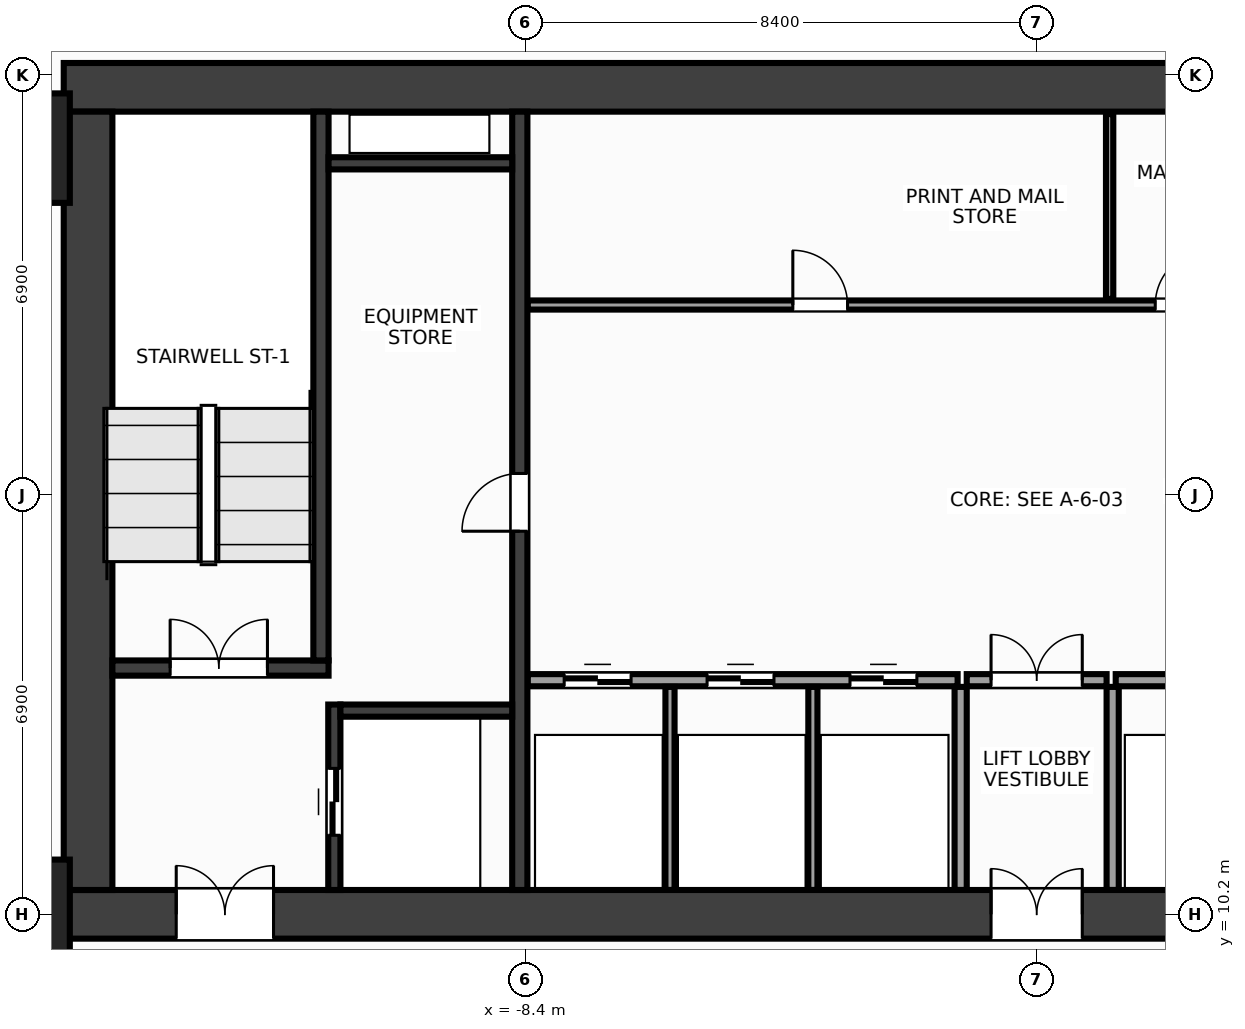
"""IFC4 building model, lengths in metres.
Left out: names, types, materials, properties, quantities, classifications, styles, units other than length and angle.
Written with IfcOpenShell. Run it as: python <this file> out.ifc"""

import sys

from ifc_helpers import new_model, si_unit, direction, frame, frame_2d, origin, origin_2d, place, context, subcontext, project, spatial, rectangle, extrude, source, transform, mapped, element, fill, save


model = new_model("IFC4")
c1 = context("Model", 3, precision=1e-05, world=origin(), true_north=direction((0.0, 1.0)))
c2 = subcontext(c1, "Body", "Model", "MODEL_VIEW")
j1 = project(units=[si_unit("LENGTHUNIT", "METRE"), si_unit("PLANEANGLEUNIT", "RADIAN")], contexts=[c1])
p1 = place(None, origin())
s1 = spatial("IfcSite", under=j1, at=p1, CompositionType="ELEMENT")
p2 = place(p1, origin())
s2 = spatial("IfcBuilding", under=s1, at=p2, CompositionType="ELEMENT")
p3 = place(p2, frame((0.0, 0.0, 45.2)))
s3 = spatial("IfcBuildingStorey", under=s2, at=p3, CompositionType="ELEMENT", Elevation=45.2)
m1 = source(origin(), c2, "Body", "SweptSolid", [
    extrude(rectangle(XDim=32.0, YDim=0.8, at=frame_2d((16.0, 0.0))), origin(), (0.0, 0.0, 1.0), 3.6),
])
p4 = place(p3, frame((-16.0, 23.8, 0.0), z_axis=(0.0, 0.0, 1.0), x_axis=(1.0, 0.0, 0.0)))
e1 = element("IfcWall", 1, at=p4, inside=s3, PredefinedType="SHEAR", context=c2, shape_type="MappedRepresentation", body=[
    mapped(m1, transform((0.0, 0.0, 0.0), x_axis=(1.0, 0.0, 0.0), y_axis=(0.0, 1.0, 0.0), z_axis=(0.0, 0.0, 1.0), scale=1.0)),
])
p5 = place(p3, frame((-16.0, 10.2, 0.0), z_axis=(0.0, 0.0, 1.0), x_axis=(1.0, 0.0, 0.0)))
e2 = element("IfcWall", 2, at=p5, inside=s3, PredefinedType="SHEAR", context=c2, shape_type="MappedRepresentation", body=[
    mapped(m1, transform((0.0, 0.0, 0.0), x_axis=(1.0, 0.0, 0.0), y_axis=(0.0, 1.0, 0.0), z_axis=(0.0, 0.0, 1.0), scale=1.0)),
])
p6 = place(p5, frame((1.85, 0.0, 0.0)))
e3 = element("IfcOpeningElement", 3, at=p6, cuts=e2, PredefinedType="OPENING", context=c2, shape_type="SweptSolid", body=[
    extrude(rectangle(XDim=1.6, YDim=2.15, at=frame_2d((0.8, 1.075))), frame((0.0, 0.412, 0.0), z_axis=(0.0, -1.0, 0.0), x_axis=(1.0, 0.0, 0.0)), (0.0, 0.0, 1.0), 0.824),
])
p7 = place(p5, frame((28.55, 0.0, 0.0)))
e4 = element("IfcOpeningElement", 4, at=p7, cuts=e2, PredefinedType="OPENING", context=c2, shape_type="SweptSolid", body=[
    extrude(rectangle(XDim=1.6, YDim=2.15, at=frame_2d((0.8, 1.075))), frame((0.0, 0.412, 0.0), z_axis=(0.0, -1.0, 0.0), x_axis=(1.0, 0.0, 0.0)), (0.0, 0.0, 1.0), 0.824),
])
p8 = place(p5, frame((15.25, 0.0, 0.0)))
e5 = element("IfcOpeningElement", 5, at=p8, cuts=e2, PredefinedType="OPENING", context=c2, shape_type="SweptSolid", body=[
    extrude(rectangle(XDim=1.5, YDim=2.2, at=frame_2d((0.75, 1.1))), frame((0.0, 0.412, 0.0), z_axis=(0.0, -1.0, 0.0), x_axis=(1.0, 0.0, 0.0)), (0.0, 0.0, 1.0), 0.824),
])
m2 = source(origin(), c2, "Body", "SweptSolid", [
    extrude(rectangle(XDim=12.8, YDim=0.8, at=frame_2d((6.4, 0.0))), origin(), (0.0, 0.0, 1.0), 3.6),
])
p9 = place(p3, frame((-15.6, 10.6, 0.0), z_axis=(0.0, 0.0, 1.0), x_axis=(0.0, 1.0, 0.0)))
e6 = element("IfcWall", 6, at=p9, inside=s3, PredefinedType="SHEAR", context=c2, shape_type="MappedRepresentation", body=[
    mapped(m2, transform((0.0, 0.0, 0.0), x_axis=(1.0, 0.0, 0.0), y_axis=(0.0, 1.0, 0.0), z_axis=(0.0, 0.0, 1.0), scale=1.0)),
])
m3 = source(origin(), c2, "Body", "SweptSolid", [
    extrude(rectangle(XDim=12.8, YDim=0.25, at=frame_2d((6.4, 0.0))), origin(), (0.0, 0.0, 1.0), 3.6),
])
p10 = place(p3, frame((-8.5, 10.6, 0.0), z_axis=(0.0, 0.0, 1.0), x_axis=(0.0, 1.0, 0.0)))
e7 = element("IfcWall", 7, at=p10, inside=s3, PredefinedType="SHEAR", context=c2, shape_type="MappedRepresentation", body=[
    mapped(m3, transform((0.0, 0.0, 0.0), x_axis=(1.0, 0.0, 0.0), y_axis=(0.0, 1.0, 0.0), z_axis=(0.0, 0.0, 1.0), scale=1.0)),
])
p11 = place(p10, frame((5.9, 0.0, 0.0)))
e8 = element("IfcOpeningElement", 8, at=p11, cuts=e7, PredefinedType="OPENING", context=c2, shape_type="SweptSolid", body=[
    extrude(rectangle(XDim=0.95, YDim=2.15, at=frame_2d((0.475, 1.075))), frame((0.0, 0.137, 0.0), z_axis=(0.0, -1.0, 0.0), x_axis=(1.0, 0.0, 0.0)), (0.0, 0.0, 1.0), 0.274),
])
m4 = source(origin(), c2, "Body", "SweptSolid", [
    extrude(rectangle(XDim=3.555, YDim=0.25, at=frame_2d((1.777, 0.0))), origin(), (0.0, 0.0, 1.0), 3.6),
])
p12 = place(p3, frame((-15.2, 14.25, 0.0), z_axis=(0.0, 0.0, 1.0), x_axis=(1.0, 0.0, 0.0)))
e9 = element("IfcWall", 9, at=p12, inside=s3, PredefinedType="SHEAR", context=c2, shape_type="MappedRepresentation", body=[
    mapped(m4, transform((0.0, 0.0, 0.0), x_axis=(1.0, 0.0, 0.0), y_axis=(0.0, 1.0, 0.0), z_axis=(0.0, 0.0, 1.0), scale=1.0)),
])
p13 = place(p12, frame((0.95, 0.0, 0.0)))
e10 = element("IfcOpeningElement", 10, at=p13, cuts=e9, PredefinedType="OPENING", context=c2, shape_type="SweptSolid", body=[
    extrude(rectangle(XDim=1.6, YDim=2.15, at=frame_2d((0.8, 1.075))), frame((0.0, 0.137, 0.0), z_axis=(0.0, -1.0, 0.0), x_axis=(1.0, 0.0, 0.0)), (0.0, 0.0, 1.0), 0.274),
])
m5 = source(origin(), c2, "Body", "SweptSolid", [
    extrude(rectangle(XDim=9.025, YDim=0.25, at=frame_2d((4.512, 0.0))), origin(), (0.0, 0.0, 1.0), 3.6),
])
p14 = place(p3, frame((-11.77, 14.375, 0.0), z_axis=(0.0, 0.0, 1.0), x_axis=(0.0, 1.0, 0.0)))
e11 = element("IfcWall", 11, at=p14, inside=s3, PredefinedType="SHEAR", context=c2, shape_type="MappedRepresentation", body=[
    mapped(m5, transform((0.0, 0.0, 0.0), x_axis=(1.0, 0.0, 0.0), y_axis=(0.0, 1.0, 0.0), z_axis=(0.0, 0.0, 1.0), scale=1.0)),
])
m6 = source(origin(), c2, "Body", "SweptSolid", [
    extrude(rectangle(XDim=3.05, YDim=0.2, at=frame_2d((1.525, 0.0))), origin(), (0.0, 0.0, 1.0), 3.6),
])
p15 = place(p3, frame((-11.55, 10.6, 0.0), z_axis=(0.0, 0.0, 1.0), x_axis=(0.0, 1.0, 0.0)))
e12 = element("IfcWall", 12, at=p15, inside=s3, PredefinedType="SHEAR", context=c2, shape_type="MappedRepresentation", body=[
    mapped(m6, transform((0.0, 0.0, 0.0), x_axis=(1.0, 0.0, 0.0), y_axis=(0.0, 1.0, 0.0), z_axis=(0.0, 0.0, 1.0), scale=1.0)),
])
p16 = place(p15, frame((0.9, 0.0, 0.0)))
e13 = element("IfcOpeningElement", 13, at=p16, cuts=e12, PredefinedType="OPENING", context=c2, shape_type="SweptSolid", body=[
    extrude(rectangle(XDim=1.1, YDim=2.15, at=frame_2d((0.55, 1.075))), frame((0.0, 0.112, 0.0), z_axis=(0.0, -1.0, 0.0), x_axis=(1.0, 0.0, 0.0)), (0.0, 0.0, 1.0), 0.224),
])
m7 = source(origin(), c2, "Body", "SweptSolid", [
    extrude(rectangle(XDim=2.825, YDim=0.2, at=frame_2d((1.413, 0.0))), origin(), (0.0, 0.0, 1.0), 3.6),
])
p17 = place(p3, frame((-11.45, 13.55, 0.0), z_axis=(0.0, 0.0, 1.0), x_axis=(1.0, 0.0, 0.0)))
e14 = element("IfcWall", 14, at=p17, inside=s3, PredefinedType="SHEAR", context=c2, shape_type="MappedRepresentation", body=[
    mapped(m7, transform((0.0, 0.0, 0.0), x_axis=(1.0, 0.0, 0.0), y_axis=(0.0, 1.0, 0.0), z_axis=(0.0, 0.0, 1.0), scale=1.0)),
])
m8 = source(origin(), c2, "Body", "SweptSolid", [
    extrude(rectangle(XDim=3.02, YDim=0.2, at=frame_2d((1.51, 0.0))), origin(), (0.0, 0.0, 1.0), 3.6),
])
p18 = place(p3, frame((-11.645, 22.55, 0.0), z_axis=(0.0, 0.0, 1.0), x_axis=(1.0, 0.0, 0.0)))
e15 = element("IfcWall", 15, at=p18, inside=s3, PredefinedType="SHEAR", context=c2, shape_type="MappedRepresentation", body=[
    mapped(m8, transform((0.0, 0.0, 0.0), x_axis=(1.0, 0.0, 0.0), y_axis=(0.0, 1.0, 0.0), z_axis=(0.0, 0.0, 1.0), scale=1.0)),
])
m9 = source(origin(), c2, "Body", "SweptSolid", [
    extrude(rectangle(XDim=1.8, YDim=1.8, at=origin_2d()), origin(), (0.0, 0.0, 1.0), 3.6),
])
for number, where, z_axis, x_axis in (
    (16, (-16.8, 10.2, 0.0), (0.0, 0.0, 1.0), (1.0, 0.0, 0.0)),
    (17, (-16.8, 22.8, 0.0), (0.0, 0.0, 1.0), (1.0, 0.0, 0.0)),
):
    element("IfcColumn", number, at=place(p3, frame(where, z_axis=z_axis, x_axis=x_axis)), inside=s3, PredefinedType="COLUMN", context=c2, shape_type="MappedRepresentation", body=[
        mapped(m9, transform((0.0, 0.0, 0.0), x_axis=(1.0, 0.0, 0.0), y_axis=(0.0, 1.0, 0.0), z_axis=(0.0, 0.0, 1.0), scale=1.0)),
    ])
m10 = source(origin(), c2, "Body", "SweptSolid", [
    extrude(rectangle(XDim=7.07, YDim=0.2, at=frame_2d((3.535, 0.0))), origin(), (0.0, 0.0, 1.0), 3.36),
])
p19 = place(p3, frame((-8.37, 14.05, 0.0), z_axis=(0.0, 0.0, 1.0), x_axis=(1.0, 0.0, 0.0)))
e18 = element("IfcWall", 18, at=p19, inside=s3, PredefinedType="PARTITIONING", context=c2, shape_type="MappedRepresentation", body=[
    mapped(m10, transform((0.0, 0.0, 0.0), x_axis=(1.0, 0.0, 0.0), y_axis=(0.0, 1.0, 0.0), z_axis=(0.0, 0.0, 1.0), scale=1.0)),
])
p20 = place(p19, frame((0.6, 0.0, 0.0)))
e19 = element("IfcOpeningElement", 19, at=p20, cuts=e18, PredefinedType="OPENING", context=c2, shape_type="SweptSolid", body=[
    extrude(rectangle(XDim=1.1, YDim=2.15, at=frame_2d((0.55, 1.075))), frame((0.0, 0.112, 0.0), z_axis=(0.0, -1.0, 0.0), x_axis=(1.0, 0.0, 0.0)), (0.0, 0.0, 1.0), 0.224),
])
p21 = place(p19, frame((2.95, 0.0, 0.0)))
e20 = element("IfcOpeningElement", 20, at=p21, cuts=e18, PredefinedType="OPENING", context=c2, shape_type="SweptSolid", body=[
    extrude(rectangle(XDim=1.1, YDim=2.15, at=frame_2d((0.55, 1.075))), frame((0.0, 0.112, 0.0), z_axis=(0.0, -1.0, 0.0), x_axis=(1.0, 0.0, 0.0)), (0.0, 0.0, 1.0), 0.224),
])
p22 = place(p19, frame((5.3, 0.0, 0.0)))
e21 = element("IfcOpeningElement", 21, at=p22, cuts=e18, PredefinedType="OPENING", context=c2, shape_type="SweptSolid", body=[
    extrude(rectangle(XDim=1.1, YDim=2.15, at=frame_2d((0.55, 1.075))), frame((0.0, 0.112, 0.0), z_axis=(0.0, -1.0, 0.0), x_axis=(1.0, 0.0, 0.0)), (0.0, 0.0, 1.0), 0.224),
])
p23 = place(p3, frame((1.3, 14.05, 0.0), z_axis=(0.0, 0.0, 1.0), x_axis=(1.0, 0.0, 0.0)))
e22 = element("IfcWall", 22, at=p23, inside=s3, PredefinedType="PARTITIONING", context=c2, shape_type="MappedRepresentation", body=[
    mapped(m10, transform((0.0, 0.0, 0.0), x_axis=(1.0, 0.0, 0.0), y_axis=(0.0, 1.0, 0.0), z_axis=(0.0, 0.0, 1.0), scale=1.0)),
])
m11 = source(origin(), c2, "Body", "SweptSolid", [
    extrude(rectangle(XDim=3.34, YDim=0.2, at=frame_2d((1.67, 0.0))), origin(), (0.0, 0.0, 1.0), 3.36),
])
for number, where, z_axis, x_axis in (
    (23, (-1.25, 10.6, 0.0), (0.0, 0.0, 1.0), (0.0, 1.0, 0.0)),
    (24, (1.25, 10.6, 0.0), (0.0, 0.0, 1.0), (0.0, 1.0, 0.0)),
):
    element("IfcWall", number, at=place(p3, frame(where, z_axis=z_axis, x_axis=x_axis)), inside=s3, PredefinedType="PARTITIONING", context=c2, shape_type="MappedRepresentation", body=[
        mapped(m11, transform((0.0, 0.0, 0.0), x_axis=(1.0, 0.0, 0.0), y_axis=(0.0, 1.0, 0.0), z_axis=(0.0, 0.0, 1.0), scale=1.0)),
    ])
m12 = source(origin(), c2, "Body", "SweptSolid", [
    extrude(rectangle(XDim=2.3, YDim=0.2, at=frame_2d((1.15, 0.0))), origin(), (0.0, 0.0, 1.0), 3.36),
])
p24 = place(p3, frame((-1.15, 14.05, 0.0), z_axis=(0.0, 0.0, 1.0), x_axis=(1.0, 0.0, 0.0)))
e25 = element("IfcWall", 25, at=p24, inside=s3, PredefinedType="PARTITIONING", context=c2, shape_type="MappedRepresentation", body=[
    mapped(m12, transform((0.0, 0.0, 0.0), x_axis=(1.0, 0.0, 0.0), y_axis=(0.0, 1.0, 0.0), z_axis=(0.0, 0.0, 1.0), scale=1.0)),
])
p25 = place(p24, frame((0.4, 0.0, 0.0)))
e26 = element("IfcOpeningElement", 26, at=p25, cuts=e25, PredefinedType="OPENING", context=c2, shape_type="SweptSolid", body=[
    extrude(rectangle(XDim=1.5, YDim=2.2, at=frame_2d((0.75, 1.1))), frame((0.0, 0.112, 0.0), z_axis=(0.0, -1.0, 0.0), x_axis=(1.0, 0.0, 0.0)), (0.0, 0.0, 1.0), 0.224),
])
m13 = source(origin(), c2, "Body", "SweptSolid", [
    extrude(rectangle(XDim=14.59, YDim=0.15, at=frame_2d((7.295, 0.0))), origin(), (0.0, 0.0, 1.0), 3.36),
])
p26 = place(p3, frame((-8.37, 20.22, 0.0), z_axis=(0.0, 0.0, 1.0), x_axis=(1.0, 0.0, 0.0)))
e27 = element("IfcWall", 27, at=p26, inside=s3, PredefinedType="PARTITIONING", context=c2, shape_type="MappedRepresentation", body=[
    mapped(m13, transform((0.0, 0.0, 0.0), x_axis=(1.0, 0.0, 0.0), y_axis=(0.0, 1.0, 0.0), z_axis=(0.0, 0.0, 1.0), scale=1.0)),
])
p27 = place(p26, frame((4.36, 0.0, 0.0)))
e28 = element("IfcOpeningElement", 28, at=p27, cuts=e27, PredefinedType="OPENING", context=c2, shape_type="SweptSolid", body=[
    extrude(rectangle(XDim=0.9, YDim=2.15, at=frame_2d((0.45, 1.075))), frame((0.0, 0.087, 0.0), z_axis=(0.0, -1.0, 0.0), x_axis=(1.0, 0.0, 0.0)), (0.0, 0.0, 1.0), 0.174),
])
p28 = place(p26, frame((10.32, 0.0, 0.0)))
e29 = element("IfcOpeningElement", 29, at=p28, cuts=e27, PredefinedType="OPENING", context=c2, shape_type="SweptSolid", body=[
    extrude(rectangle(XDim=0.9, YDim=2.15, at=frame_2d((0.45, 1.075))), frame((0.0, 0.087, 0.0), z_axis=(0.0, -1.0, 0.0), x_axis=(1.0, 0.0, 0.0)), (0.0, 0.0, 1.0), 0.174),
])
p29 = place(p26, frame((12.77, 0.0, 0.0)))
e30 = element("IfcOpeningElement", 30, at=p29, cuts=e27, PredefinedType="OPENING", context=c2, shape_type="SweptSolid", body=[
    extrude(rectangle(XDim=0.9, YDim=2.15, at=frame_2d((0.45, 1.075))), frame((0.0, 0.087, 0.0), z_axis=(0.0, -1.0, 0.0), x_axis=(1.0, 0.0, 0.0)), (0.0, 0.0, 1.0), 0.174),
])
m14 = source(origin(), c2, "Body", "SweptSolid", [
    extrude(rectangle(XDim=3.34, YDim=0.15, at=frame_2d((1.67, 0.0))), origin(), (0.0, 0.0, 1.0), 3.36),
])
for number, where, z_axis, x_axis in (
    (31, (-6.03, 10.6, 0.0), (0.0, 0.0, 1.0), (0.0, 1.0, 0.0)),
    (32, (-3.68, 10.6, 0.0), (0.0, 0.0, 1.0), (0.0, 1.0, 0.0)),
):
    element("IfcWall", number, at=place(p3, frame(where, z_axis=z_axis, x_axis=x_axis)), inside=s3, PredefinedType="PARTITIONING", context=c2, shape_type="MappedRepresentation", body=[
        mapped(m14, transform((0.0, 0.0, 0.0), x_axis=(1.0, 0.0, 0.0), y_axis=(0.0, 1.0, 0.0), z_axis=(0.0, 0.0, 1.0), scale=1.0)),
    ])
m15 = source(origin(), c2, "Body", "SweptSolid", [
    extrude(rectangle(XDim=3.04, YDim=0.12, at=frame_2d((1.52, 0.0))), origin(), (0.0, 0.0, 1.0), 3.36),
])
p30 = place(p3, frame((1.2, 20.32, 0.0), z_axis=(0.0, 0.0, 1.0), x_axis=(0.0, 1.0, 0.0)))
e33 = element("IfcWall", 33, at=p30, inside=s3, PredefinedType="PARTITIONING", context=c2, shape_type="MappedRepresentation", body=[
    mapped(m15, transform((0.0, 0.0, 0.0), x_axis=(1.0, 0.0, 0.0), y_axis=(0.0, 1.0, 0.0), z_axis=(0.0, 0.0, 1.0), scale=1.0)),
])
m16 = source(origin(), c2, "Body", "SweptSolid", [
    extrude(rectangle(XDim=1.6, YDim=2.15, at=frame_2d((0.8, 1.075))), frame((0.0, 0.025, 0.0), z_axis=(0.0, -1.0, 0.0), x_axis=(1.0, 0.0, 0.0)), (0.0, 0.0, 1.0), 0.05),
])
p31 = place(p13, origin())
e34 = element("IfcDoor", 34, at=p31, inside=s3, OperationType="DOUBLE_DOOR_SINGLE_SWING", PredefinedType="DOOR", context=c2, shape_type="MappedRepresentation", body=[
    mapped(m16, transform((0.0, 0.0, 0.0), x_axis=(1.0, 0.0, 0.0), y_axis=(0.0, 1.0, 0.0), z_axis=(0.0, 0.0, 1.0), scale=1.0)),
])
fill(e10, e34)
p32 = place(p6, origin())
e35 = element("IfcDoor", 35, at=p32, inside=s3, OperationType="DOUBLE_DOOR_SINGLE_SWING", PredefinedType="DOOR", context=c2, shape_type="MappedRepresentation", body=[
    mapped(m16, transform((0.0, 0.0, 0.0), x_axis=(1.0, 0.0, 0.0), y_axis=(0.0, 1.0, 0.0), z_axis=(0.0, 0.0, 1.0), scale=1.0)),
])
fill(e3, e35)
m17 = source(origin(), c2, "Body", "SweptSolid", [
    extrude(rectangle(XDim=1.1, YDim=2.15, at=frame_2d((0.55, 1.075))), frame((0.0, 0.025, 0.0), z_axis=(0.0, -1.0, 0.0), x_axis=(1.0, 0.0, 0.0)), (0.0, 0.0, 1.0), 0.05),
])
p33 = place(p16, origin())
e36 = element("IfcDoor", 36, at=p33, inside=s3, OperationType="DOUBLE_DOOR_SLIDING", PredefinedType="DOOR", context=c2, shape_type="MappedRepresentation", body=[
    mapped(m17, transform((0.0, 0.0, 0.0), x_axis=(1.0, 0.0, 0.0), y_axis=(0.0, 1.0, 0.0), z_axis=(0.0, 0.0, 1.0), scale=1.0)),
])
fill(e13, e36)
m18 = source(origin(), c2, "Body", "SweptSolid", [
    extrude(rectangle(XDim=0.95, YDim=2.15, at=frame_2d((0.475, 1.075))), frame((0.0, 0.025, 0.0), z_axis=(0.0, -1.0, 0.0), x_axis=(1.0, 0.0, 0.0)), (0.0, 0.0, 1.0), 0.05),
])
p34 = place(p11, origin())
e37 = element("IfcDoor", 37, at=p34, inside=s3, OperationType="SINGLE_SWING_LEFT", PredefinedType="DOOR", context=c2, shape_type="MappedRepresentation", body=[
    mapped(m18, transform((0.0, 0.0, 0.0), x_axis=(1.0, 0.0, 0.0), y_axis=(0.0, 1.0, 0.0), z_axis=(0.0, 0.0, 1.0), scale=1.0)),
])
fill(e8, e37)
p35 = place(p20, origin())
e38 = element("IfcDoor", 38, at=p35, inside=s3, OperationType="DOUBLE_DOOR_SLIDING", PredefinedType="DOOR", context=c2, shape_type="MappedRepresentation", body=[
    mapped(m17, transform((0.0, 0.0, 0.0), x_axis=(1.0, 0.0, 0.0), y_axis=(0.0, 1.0, 0.0), z_axis=(0.0, 0.0, 1.0), scale=1.0)),
])
fill(e19, e38)
p36 = place(p21, origin())
e39 = element("IfcDoor", 39, at=p36, inside=s3, OperationType="DOUBLE_DOOR_SLIDING", PredefinedType="DOOR", context=c2, shape_type="MappedRepresentation", body=[
    mapped(m17, transform((0.0, 0.0, 0.0), x_axis=(1.0, 0.0, 0.0), y_axis=(0.0, 1.0, 0.0), z_axis=(0.0, 0.0, 1.0), scale=1.0)),
])
fill(e20, e39)
p37 = place(p22, origin())
e40 = element("IfcDoor", 40, at=p37, inside=s3, OperationType="DOUBLE_DOOR_SLIDING", PredefinedType="DOOR", context=c2, shape_type="MappedRepresentation", body=[
    mapped(m17, transform((0.0, 0.0, 0.0), x_axis=(1.0, 0.0, 0.0), y_axis=(0.0, 1.0, 0.0), z_axis=(0.0, 0.0, 1.0), scale=1.0)),
])
fill(e21, e40)
m19 = source(origin(), c2, "Body", "SweptSolid", [
    extrude(rectangle(XDim=1.5, YDim=2.2, at=frame_2d((0.75, 1.1))), frame((0.0, 0.025, 0.0), z_axis=(0.0, -1.0, 0.0), x_axis=(1.0, 0.0, 0.0)), (0.0, 0.0, 1.0), 0.05),
])
p38 = place(p25, origin())
e41 = element("IfcDoor", 41, at=p38, inside=s3, OperationType="DOUBLE_DOOR_SINGLE_SWING", PredefinedType="DOOR", context=c2, shape_type="MappedRepresentation", body=[
    mapped(m19, transform((0.0, 0.0, 0.0), x_axis=(1.0, 0.0, 0.0), y_axis=(0.0, 1.0, 0.0), z_axis=(0.0, 0.0, 1.0), scale=1.0)),
])
fill(e26, e41)
p39 = place(p8, origin())
e42 = element("IfcDoor", 42, at=p39, inside=s3, OperationType="DOUBLE_DOOR_SINGLE_SWING", PredefinedType="DOOR", context=c2, shape_type="MappedRepresentation", body=[
    mapped(m19, transform((0.0, 0.0, 0.0), x_axis=(1.0, 0.0, 0.0), y_axis=(0.0, 1.0, 0.0), z_axis=(0.0, 0.0, 1.0), scale=1.0)),
])
fill(e5, e42)
m20 = source(origin(), c2, "Body", "SweptSolid", [
    extrude(rectangle(XDim=0.9, YDim=2.15, at=frame_2d((0.45, 1.075))), frame((0.0, 0.025, 0.0), z_axis=(0.0, -1.0, 0.0), x_axis=(1.0, 0.0, 0.0)), (0.0, 0.0, 1.0), 0.05),
])
p40 = place(p27, origin())
e43 = element("IfcDoor", 43, at=p40, inside=s3, OperationType="SINGLE_SWING_LEFT", PredefinedType="DOOR", context=c2, shape_type="MappedRepresentation", body=[
    mapped(m20, transform((0.0, 0.0, 0.0), x_axis=(1.0, 0.0, 0.0), y_axis=(0.0, 1.0, 0.0), z_axis=(0.0, 0.0, 1.0), scale=1.0)),
])
fill(e28, e43)
p41 = place(p28, origin())
e44 = element("IfcDoor", 44, at=p41, inside=s3, OperationType="SINGLE_SWING_RIGHT", PredefinedType="DOOR", context=c2, shape_type="MappedRepresentation", body=[
    mapped(m20, transform((0.0, 0.0, 0.0), x_axis=(1.0, 0.0, 0.0), y_axis=(0.0, 1.0, 0.0), z_axis=(0.0, 0.0, 1.0), scale=1.0)),
])
fill(e29, e44)
save(model, sys.argv[1])
